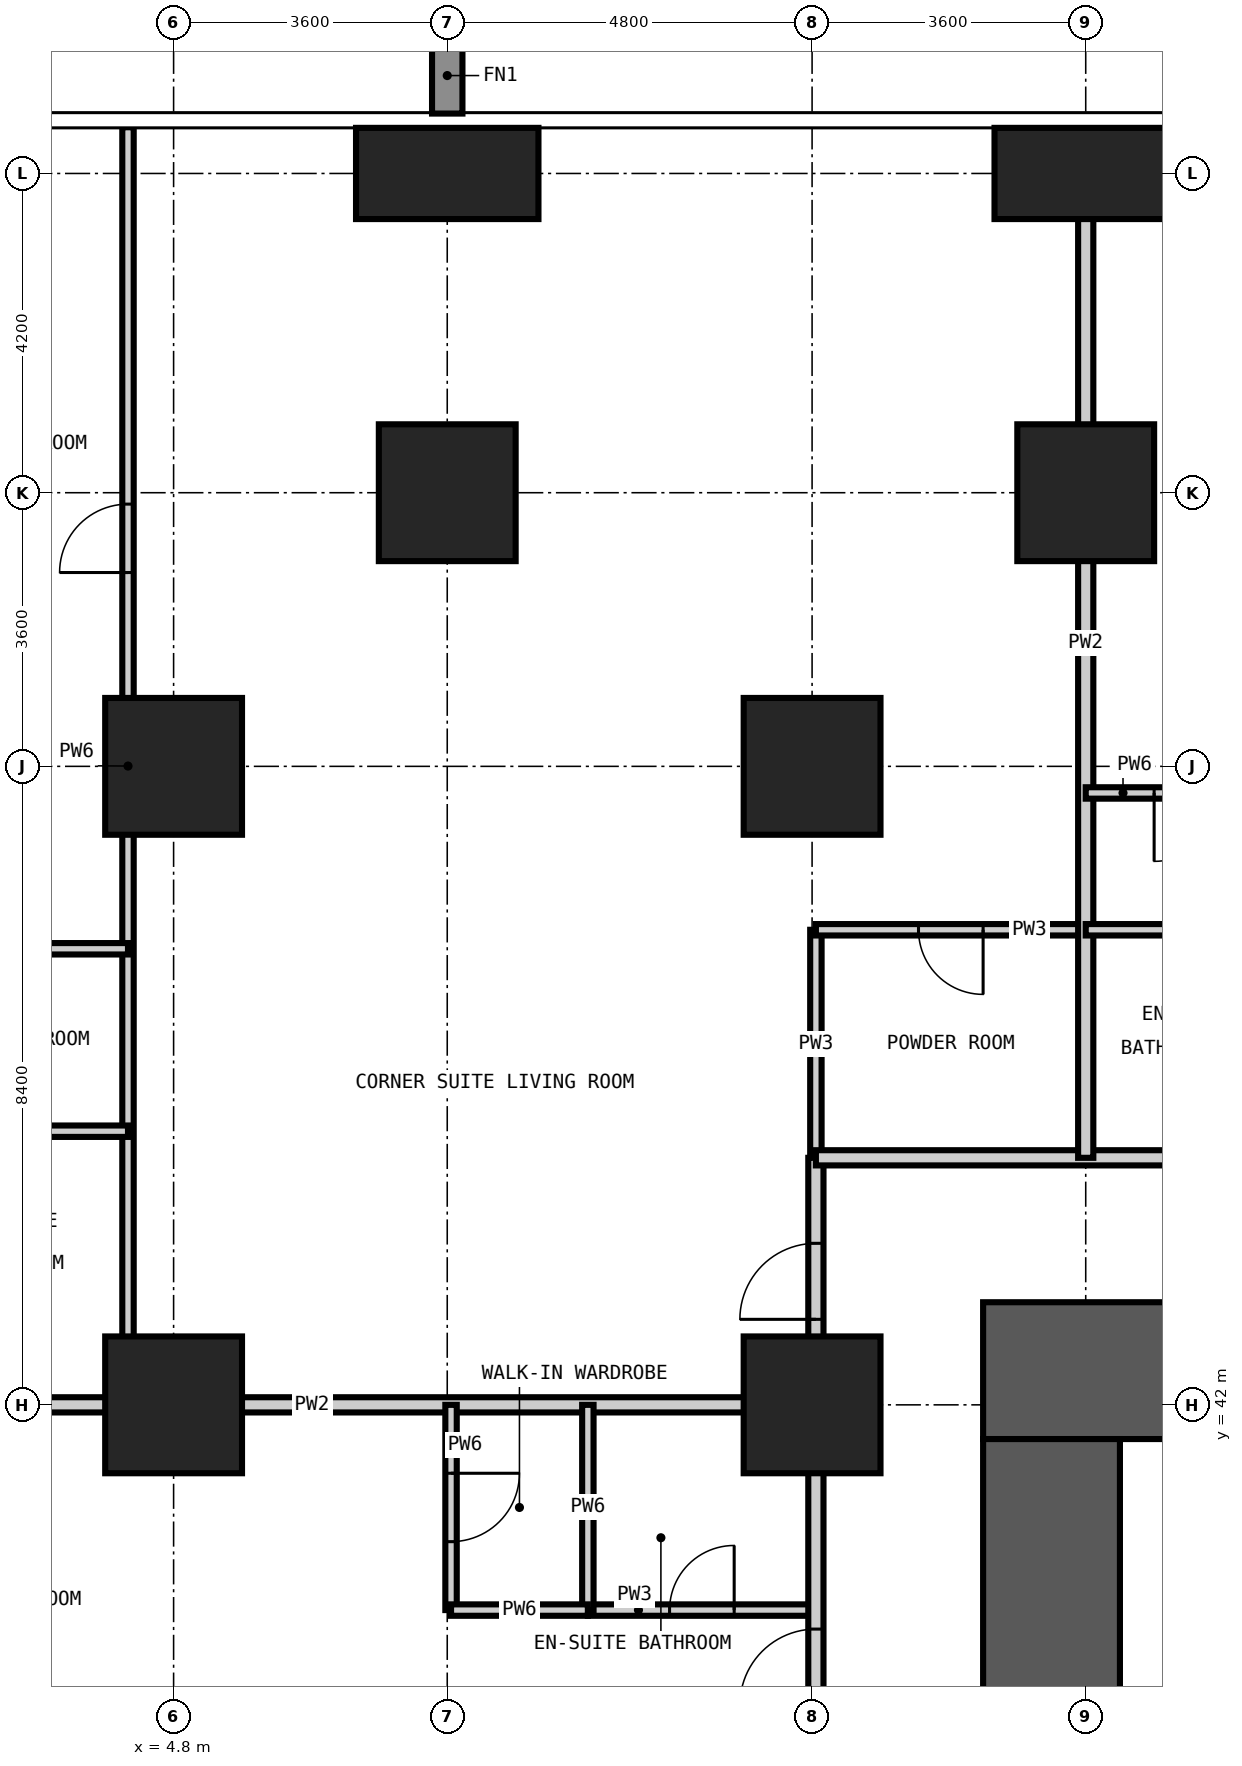
"""IFC4 building model, lengths in metres.
Left out: names, types, materials, properties, quantities, classifications, styles, units other than length and angle.
Written with IfcOpenShell. Run it as: python <this file> out.ifc"""

import sys

from ifc_helpers import new_model, si_unit, direction, frame, frame_2d, origin, origin_2d, place, context, subcontext, project, spatial, rectangle, extrude, element, fill, save


model = new_model("IFC4")
c1 = context("Model", 3, precision=1e-05, world=origin(), true_north=direction((0.0, 1.0)))
c2 = subcontext(c1, "Body", "Model", "MODEL_VIEW")
j1 = project(units=[si_unit("LENGTHUNIT", "METRE"), si_unit("PLANEANGLEUNIT", "RADIAN")], contexts=[c1])
p1 = place(None, origin())
s1 = spatial("IfcSite", under=j1, at=p1, CompositionType="ELEMENT")
p2 = place(p1, origin())
s2 = spatial("IfcBuilding", under=s1, at=p2, CompositionType="ELEMENT")
p3 = place(p2, frame((0.0, 0.0, 34.2)))
s3 = spatial("IfcBuildingStorey", under=s2, at=p3, CompositionType="ELEMENT", Elevation=34.2)
for number, where, z_axis, x_axis in (
    (1, (4.8, 42.0, -0.35), (0.0, 0.0, 1.0), (1.0, 0.0, 0.0)),
    (2, (4.8, 50.4, -0.35), (0.0, 0.0, 1.0), (1.0, 0.0, 0.0)),
    (3, (8.4, 54.0, -0.35), (0.0, 0.0, 1.0), (1.0, 0.0, 0.0)),
):
    element("IfcColumn", number, at=place(p3, frame(where, z_axis=z_axis, x_axis=x_axis)), inside=s3, PredefinedType="COLUMN", context=c2, shape_type="SweptSolid", body=[
        extrude(rectangle(XDim=1.8, YDim=1.8, at=origin_2d()), origin(), (0.0, 0.0, 1.0), 3.6),
    ])
p4 = place(p3, frame((8.4, 58.2, -0.35), z_axis=(0.0, 0.0, 1.0), x_axis=(1.0, 0.0, 0.0)))
e4 = element("IfcColumn", 4, at=p4, inside=s3, PredefinedType="COLUMN", context=c2, shape_type="SweptSolid", body=[
    extrude(rectangle(XDim=2.4, YDim=1.2, at=origin_2d()), origin(), (0.0, 0.0, 1.0), 3.6),
])
for number, where, z_axis, x_axis in (
    (5, (13.2, 42.0, -0.35), (0.0, 0.0, 1.0), (1.0, 0.0, 0.0)),
    (6, (13.2, 50.4, -0.35), (0.0, 0.0, 1.0), (1.0, 0.0, 0.0)),
    (7, (16.8, 54.0, -0.35), (0.0, 0.0, 1.0), (1.0, 0.0, 0.0)),
):
    element("IfcColumn", number, at=place(p3, frame(where, z_axis=z_axis, x_axis=x_axis)), inside=s3, PredefinedType="COLUMN", context=c2, shape_type="SweptSolid", body=[
        extrude(rectangle(XDim=1.8, YDim=1.8, at=origin_2d()), origin(), (0.0, 0.0, 1.0), 3.6),
    ])
p5 = place(p3, frame((16.8, 58.2, -0.35), z_axis=(0.0, 0.0, 1.0), x_axis=(1.0, 0.0, 0.0)))
e8 = element("IfcColumn", 8, at=p5, inside=s3, PredefinedType="COLUMN", context=c2, shape_type="SweptSolid", body=[
    extrude(rectangle(XDim=2.4, YDim=1.2, at=origin_2d()), origin(), (0.0, 0.0, 1.0), 3.6),
])
p6 = place(p3, frame((43.35, 42.45, -0.35), z_axis=(0.0, 0.0, 1.0), x_axis=(-1.0, 0.0, 0.0)))
e9 = element("IfcWall", 9, at=p6, inside=s3, PredefinedType="SHEAR", context=c2, shape_type="SweptSolid", body=[
    extrude(rectangle(XDim=27.9, YDim=1.8, at=frame_2d((13.95, 0.0))), origin(), (0.0, 0.0, 1.0), 3.6),
])
p7 = place(p6, frame((21.85, 0.0, 0.35)))
e10 = element("IfcOpeningElement", 10, at=p7, cuts=e9, PredefinedType="OPENING", context=c2, shape_type="SweptSolid", body=[
    extrude(rectangle(XDim=1.0, YDim=2.1, at=frame_2d((0.5, 1.05))), frame((0.0, 0.91, 0.0), z_axis=(0.0, -1.0, 0.0), x_axis=(1.0, 0.0, 0.0)), (0.0, 0.0, 1.0), 1.82),
])
p8 = place(p6, frame((11.25, 0.0, 0.35)))
e11 = element("IfcOpeningElement", 11, at=p8, cuts=e9, PredefinedType="OPENING", context=c2, shape_type="SweptSolid", body=[
    extrude(rectangle(XDim=1.2, YDim=2.2, at=frame_2d((0.6, 1.1))), frame((0.0, 0.91, 0.0), z_axis=(0.0, -1.0, 0.0), x_axis=(1.0, 0.0, 0.0)), (0.0, 0.0, 1.0), 1.82),
])
p9 = place(p3, frame((16.35, 41.55, -0.35), z_axis=(0.0, 0.0, 1.0), x_axis=(0.0, -1.0, 0.0)))
e12 = element("IfcWall", 12, at=p9, inside=s3, PredefinedType="SHEAR", context=c2, shape_type="SweptSolid", body=[
    extrude(rectangle(XDim=24.3, YDim=1.8, at=frame_2d((12.15, 0.0))), origin(), (0.0, 0.0, 1.0), 3.6),
])
p10 = place(p9, frame((11.25, 0.0, 0.35)))
e13 = element("IfcOpeningElement", 13, at=p10, cuts=e12, PredefinedType="OPENING", context=c2, shape_type="SweptSolid", body=[
    extrude(rectangle(XDim=1.8, YDim=2.2, at=frame_2d((0.9, 1.1))), frame((0.0, 0.91, 0.0), z_axis=(0.0, -1.0, 0.0), x_axis=(1.0, 0.0, 0.0)), (0.0, 0.0, 1.0), 1.82),
])
p11 = place(p9, frame((20.05, 0.0, 0.35)))
e14 = element("IfcOpeningElement", 14, at=p11, cuts=e12, PredefinedType="OPENING", context=c2, shape_type="SweptSolid", body=[
    extrude(rectangle(XDim=1.0, YDim=2.1, at=frame_2d((0.5, 1.05))), frame((0.0, 0.91, 0.0), z_axis=(0.0, -1.0, 0.0), x_axis=(1.0, 0.0, 0.0)), (0.0, 0.0, 1.0), 1.82),
])
p12 = place(p9, frame((5.35, 0.0, 0.35)))
e15 = element("IfcOpeningElement", 15, at=p12, cuts=e12, PredefinedType="OPENING", context=c2, shape_type="SweptSolid", body=[
    extrude(rectangle(XDim=1.0, YDim=2.1, at=frame_2d((0.5, 1.05))), frame((0.0, 0.91, 0.0), z_axis=(0.0, -1.0, 0.0), x_axis=(1.0, 0.0, 0.0)), (0.0, 0.0, 1.0), 1.82),
])
p13 = place(p3, frame((13.25, 45.25, 0.0), z_axis=(0.0, 0.0, 1.0), x_axis=(0.0, 1.0, 0.0)))
e16 = element("IfcWall", 16, at=p13, inside=s3, PredefinedType="PARTITIONING", context=c2, shape_type="SweptSolid", body=[
    extrude(rectangle(XDim=3.0, YDim=0.15, at=frame_2d((1.5, 0.0))), origin(), (0.0, 0.0, 1.0), 3.25),
])
p14 = place(p3, frame((10.25, 39.3, 0.0), z_axis=(0.0, 0.0, 1.0), x_axis=(1.0, 0.0, 0.0)))
e17 = element("IfcWall", 17, at=p14, inside=s3, PredefinedType="PARTITIONING", context=c2, shape_type="SweptSolid", body=[
    extrude(rectangle(XDim=3.0, YDim=0.15, at=frame_2d((1.5, 0.0))), origin(), (0.0, 0.0, 1.0), 3.25),
])
p15 = place(p14, frame((1.075, 0.0, 0.0)))
e18 = element("IfcOpeningElement", 18, at=p15, cuts=e17, PredefinedType="OPENING", context=c2, shape_type="SweptSolid", body=[
    extrude(rectangle(XDim=0.85, YDim=2.1, at=frame_2d((0.425, 1.05))), frame((0.0, 0.085, 0.0), z_axis=(0.0, -1.0, 0.0), x_axis=(1.0, 0.0, 0.0)), (0.0, 0.0, 1.0), 0.17),
])
p16 = place(p3, frame((13.25, 48.25, 0.0), z_axis=(0.0, 0.0, 1.0), x_axis=(1.0, 0.0, 0.0)))
e19 = element("IfcWall", 19, at=p16, inside=s3, PredefinedType="PARTITIONING", context=c2, shape_type="SweptSolid", body=[
    extrude(rectangle(XDim=3.55, YDim=0.15, at=frame_2d((1.775, 0.0))), origin(), (0.0, 0.0, 1.0), 3.25),
])
p17 = place(p16, frame((1.35, 0.0, 0.0)))
e20 = element("IfcOpeningElement", 20, at=p17, cuts=e19, PredefinedType="OPENING", context=c2, shape_type="SweptSolid", body=[
    extrude(rectangle(XDim=0.85, YDim=2.1, at=frame_2d((0.425, 1.05))), frame((0.0, 0.085, 0.0), z_axis=(0.0, -1.0, 0.0), x_axis=(1.0, 0.0, 0.0)), (0.0, 0.0, 1.0), 0.17),
])
p18 = place(p3, frame((13.25, 13.25, 0.0), z_axis=(0.0, 0.0, 1.0), x_axis=(0.0, 1.0, 0.0)))
e21 = element("IfcWall", 21, at=p18, inside=s3, PredefinedType="PARTITIONING", context=c2, shape_type="SweptSolid", body=[
    extrude(rectangle(XDim=32.0, YDim=0.2, at=frame_2d((16.0, 0.0))), origin(), (0.0, 0.0, 1.0), 3.25),
])
p19 = place(p18, frame((9.35, 0.0, 0.0)))
e22 = element("IfcOpeningElement", 22, at=p19, cuts=e21, PredefinedType="OPENING", context=c2, shape_type="SweptSolid", body=[
    extrude(rectangle(XDim=1.0, YDim=2.2, at=frame_2d((0.5, 1.1))), frame((0.0, 0.11, 0.0), z_axis=(0.0, -1.0, 0.0), x_axis=(1.0, 0.0, 0.0)), (0.0, 0.0, 1.0), 0.22),
])
p20 = place(p18, frame((16.4, 0.0, 0.0)))
e23 = element("IfcOpeningElement", 23, at=p20, cuts=e21, PredefinedType="OPENING", context=c2, shape_type="SweptSolid", body=[
    extrude(rectangle(XDim=1.0, YDim=2.2, at=frame_2d((0.5, 1.1))), frame((0.0, 0.11, 0.0), z_axis=(0.0, -1.0, 0.0), x_axis=(1.0, 0.0, 0.0)), (0.0, 0.0, 1.0), 0.22),
])
p21 = place(p18, frame((23.3, 0.0, 0.0)))
e24 = element("IfcOpeningElement", 24, at=p21, cuts=e21, PredefinedType="OPENING", context=c2, shape_type="SweptSolid", body=[
    extrude(rectangle(XDim=1.0, YDim=2.2, at=frame_2d((0.5, 1.1))), frame((0.0, 0.11, 0.0), z_axis=(0.0, -1.0, 0.0), x_axis=(1.0, 0.0, 0.0)), (0.0, 0.0, 1.0), 0.22),
])
p22 = place(p18, frame((24.8, 0.0, 0.0)))
e25 = element("IfcOpeningElement", 25, at=p22, cuts=e21, PredefinedType="OPENING", context=c2, shape_type="SweptSolid", body=[
    extrude(rectangle(XDim=1.0, YDim=2.2, at=frame_2d((0.5, 1.1))), frame((0.0, 0.11, 0.0), z_axis=(0.0, -1.0, 0.0), x_axis=(1.0, 0.0, 0.0)), (0.0, 0.0, 1.0), 0.22),
])
p23 = place(p18, frame((1.275, 0.0, 0.0)))
e26 = element("IfcOpeningElement", 26, at=p23, cuts=e21, PredefinedType="OPENING", context=c2, shape_type="SweptSolid", body=[
    extrude(rectangle(XDim=1.0, YDim=2.2, at=frame_2d((0.5, 1.1))), frame((0.0, 0.11, 0.0), z_axis=(0.0, -1.0, 0.0), x_axis=(1.0, 0.0, 0.0)), (0.0, 0.0, 1.0), 0.22),
])
p24 = place(p18, frame((29.875, 0.0, 0.0)))
e27 = element("IfcOpeningElement", 27, at=p24, cuts=e21, PredefinedType="OPENING", context=c2, shape_type="SweptSolid", body=[
    extrude(rectangle(XDim=1.0, YDim=2.2, at=frame_2d((0.5, 1.1))), frame((0.0, 0.11, 0.0), z_axis=(0.0, -1.0, 0.0), x_axis=(1.0, 0.0, 0.0)), (0.0, 0.0, 1.0), 0.22),
])
p25 = place(p3, frame((13.25, 45.25, 0.0), z_axis=(0.0, 0.0, 1.0), x_axis=(1.0, 0.0, 0.0)))
e28 = element("IfcWall", 28, at=p25, inside=s3, PredefinedType="PARTITIONING", context=c2, shape_type="SweptSolid", body=[
    extrude(rectangle(XDim=32.6, YDim=0.2, at=frame_2d((16.3, 0.0))), origin(), (0.0, 0.0, 1.0), 3.25),
])
p26 = place(p25, frame((6.5, 0.0, 0.0)))
e29 = element("IfcOpeningElement", 29, at=p26, cuts=e28, PredefinedType="OPENING", context=c2, shape_type="SweptSolid", body=[
    extrude(rectangle(XDim=1.0, YDim=2.2, at=frame_2d((0.5, 1.1))), frame((0.0, 0.11, 0.0), z_axis=(0.0, -1.0, 0.0), x_axis=(1.0, 0.0, 0.0)), (0.0, 0.0, 1.0), 0.22),
])
p27 = place(p25, frame((11.45, 0.0, 0.0)))
e30 = element("IfcOpeningElement", 30, at=p27, cuts=e28, PredefinedType="OPENING", context=c2, shape_type="SweptSolid", body=[
    extrude(rectangle(XDim=1.0, YDim=2.2, at=frame_2d((0.5, 1.1))), frame((0.0, 0.11, 0.0), z_axis=(0.0, -1.0, 0.0), x_axis=(1.0, 0.0, 0.0)), (0.0, 0.0, 1.0), 0.22),
])
p28 = place(p25, frame((19.85, 0.0, 0.0)))
e31 = element("IfcOpeningElement", 31, at=p28, cuts=e28, PredefinedType="OPENING", context=c2, shape_type="SweptSolid", body=[
    extrude(rectangle(XDim=1.0, YDim=2.2, at=frame_2d((0.5, 1.1))), frame((0.0, 0.11, 0.0), z_axis=(0.0, -1.0, 0.0), x_axis=(1.0, 0.0, 0.0)), (0.0, 0.0, 1.0), 0.22),
])
p29 = place(p25, frame((24.8, 0.0, 0.0)))
e32 = element("IfcOpeningElement", 32, at=p29, cuts=e28, PredefinedType="OPENING", context=c2, shape_type="SweptSolid", body=[
    extrude(rectangle(XDim=1.0, YDim=2.2, at=frame_2d((0.5, 1.1))), frame((0.0, 0.11, 0.0), z_axis=(0.0, -1.0, 0.0), x_axis=(1.0, 0.0, 0.0)), (0.0, 0.0, 1.0), 0.22),
])
p30 = place(p3, frame((16.8, 45.25, 0.0), z_axis=(0.0, 0.0, 1.0), x_axis=(0.0, 1.0, 0.0)))
e33 = element("IfcWall", 33, at=p30, inside=s3, PredefinedType="PARTITIONING", context=c2, shape_type="SweptSolid", body=[
    extrude(rectangle(XDim=13.558, YDim=0.2, at=frame_2d((6.779, 0.0))), origin(), (0.0, 0.0, 1.0), 3.25),
])
p31 = place(p3, frame((-0.008, 42.0, 0.0), z_axis=(0.0, 0.0, 1.0), x_axis=(1.0, 0.0, 0.0)))
e34 = element("IfcWall", 34, at=p31, inside=s3, PredefinedType="PARTITIONING", context=c2, shape_type="SweptSolid", body=[
    extrude(rectangle(XDim=13.258, YDim=0.2, at=frame_2d((6.629, 0.0))), origin(), (0.0, 0.0, 1.0), 3.25),
])
p32 = place(p3, frame((4.2, 42.0, 0.0), z_axis=(0.0, 0.0, 1.0), x_axis=(0.0, 1.0, 0.0)))
e35 = element("IfcWall", 35, at=p32, inside=s3, PredefinedType="PARTITIONING", context=c2, shape_type="SweptSolid", body=[
    extrude(rectangle(XDim=16.808, YDim=0.15, at=frame_2d((8.404, 0.0))), origin(), (0.0, 0.0, 1.0), 3.25),
])
p33 = place(p32, frame((10.95, 0.0, 0.0)))
e36 = element("IfcOpeningElement", 36, at=p33, cuts=e35, PredefinedType="OPENING", context=c2, shape_type="SweptSolid", body=[
    extrude(rectangle(XDim=0.9, YDim=2.1, at=frame_2d((0.45, 1.05))), frame((0.0, 0.085, 0.0), z_axis=(0.0, -1.0, 0.0), x_axis=(1.0, 0.0, 0.0)), (0.0, 0.0, 1.0), 0.17),
])
p34 = place(p3, frame((8.45, 39.3, 0.0), z_axis=(0.0, 0.0, 1.0), x_axis=(0.0, 1.0, 0.0)))
e37 = element("IfcWall", 37, at=p34, inside=s3, PredefinedType="PARTITIONING", context=c2, shape_type="SweptSolid", body=[
    extrude(rectangle(XDim=2.7, YDim=0.15, at=frame_2d((1.35, 0.0))), origin(), (0.0, 0.0, 1.0), 3.25),
])
p35 = place(p34, frame((0.9, 0.0, 0.0)))
e38 = element("IfcOpeningElement", 38, at=p35, cuts=e37, PredefinedType="OPENING", context=c2, shape_type="SweptSolid", body=[
    extrude(rectangle(XDim=0.9, YDim=2.1, at=frame_2d((0.45, 1.05))), frame((0.0, 0.085, 0.0), z_axis=(0.0, -1.0, 0.0), x_axis=(1.0, 0.0, 0.0)), (0.0, 0.0, 1.0), 0.17),
])
p36 = place(p3, frame((10.25, 39.3, 0.0), z_axis=(0.0, 0.0, 1.0), x_axis=(0.0, 1.0, 0.0)))
e39 = element("IfcWall", 39, at=p36, inside=s3, PredefinedType="PARTITIONING", context=c2, shape_type="SweptSolid", body=[
    extrude(rectangle(XDim=2.7, YDim=0.15, at=frame_2d((1.35, 0.0))), origin(), (0.0, 0.0, 1.0), 3.25),
])
p37 = place(p3, frame((8.45, 39.3, 0.0), z_axis=(0.0, 0.0, 1.0), x_axis=(1.0, 0.0, 0.0)))
e40 = element("IfcWall", 40, at=p37, inside=s3, PredefinedType="PARTITIONING", context=c2, shape_type="SweptSolid", body=[
    extrude(rectangle(XDim=1.8, YDim=0.15, at=frame_2d((0.9, 0.0))), origin(), (0.0, 0.0, 1.0), 3.25),
])
p38 = place(p3, frame((1.2, 45.6, 0.0), z_axis=(0.0, 0.0, 1.0), x_axis=(1.0, 0.0, 0.0)))
e41 = element("IfcWall", 41, at=p38, inside=s3, PredefinedType="PARTITIONING", context=c2, shape_type="SweptSolid", body=[
    extrude(rectangle(XDim=3.0, YDim=0.15, at=frame_2d((1.5, 0.0))), origin(), (0.0, 0.0, 1.0), 3.25),
])
p39 = place(p3, frame((1.2, 48.0, 0.0), z_axis=(0.0, 0.0, 1.0), x_axis=(1.0, 0.0, 0.0)))
e42 = element("IfcWall", 42, at=p39, inside=s3, PredefinedType="PARTITIONING", context=c2, shape_type="SweptSolid", body=[
    extrude(rectangle(XDim=3.0, YDim=0.15, at=frame_2d((1.5, 0.0))), origin(), (0.0, 0.0, 1.0), 3.25),
])
p40 = place(p39, frame((1.05, 0.0, 0.0)))
e43 = element("IfcOpeningElement", 43, at=p40, cuts=e42, PredefinedType="OPENING", context=c2, shape_type="SweptSolid", body=[
    extrude(rectangle(XDim=0.9, YDim=2.1, at=frame_2d((0.45, 1.05))), frame((0.0, 0.085, 0.0), z_axis=(0.0, -1.0, 0.0), x_axis=(1.0, 0.0, 0.0)), (0.0, 0.0, 1.0), 0.17),
])
p41 = place(p3, frame((16.8, 48.25, 0.0), z_axis=(0.0, 0.0, 1.0), x_axis=(1.0, 0.0, 0.0)))
e44 = element("IfcWall", 44, at=p41, inside=s3, PredefinedType="PARTITIONING", context=c2, shape_type="SweptSolid", body=[
    extrude(rectangle(XDim=2.7, YDim=0.15, at=frame_2d((1.35, 0.0))), origin(), (0.0, 0.0, 1.0), 3.25),
])
p42 = place(p3, frame((16.8, 50.05, 0.0), z_axis=(0.0, 0.0, 1.0), x_axis=(1.0, 0.0, 0.0)))
e45 = element("IfcWall", 45, at=p42, inside=s3, PredefinedType="PARTITIONING", context=c2, shape_type="SweptSolid", body=[
    extrude(rectangle(XDim=2.7, YDim=0.15, at=frame_2d((1.35, 0.0))), origin(), (0.0, 0.0, 1.0), 3.25),
])
p43 = place(p42, frame((0.9, 0.0, 0.0)))
e46 = element("IfcOpeningElement", 46, at=p43, cuts=e45, PredefinedType="OPENING", context=c2, shape_type="SweptSolid", body=[
    extrude(rectangle(XDim=0.9, YDim=2.1, at=frame_2d((0.45, 1.05))), frame((0.0, 0.085, 0.0), z_axis=(0.0, -1.0, 0.0), x_axis=(1.0, 0.0, 0.0)), (0.0, 0.0, 1.0), 0.17),
])
p44 = place(p43, frame((0.9, 0.0, 0.0), z_axis=(0.0, 0.0, 1.0), x_axis=(-1.0, 0.0, 0.0)))
e47 = element("IfcDoor", 47, at=p44, inside=s3, OperationType="SINGLE_SWING_RIGHT", PredefinedType="DOOR", context=c2, shape_type="SweptSolid", body=[
    extrude(rectangle(XDim=0.9, YDim=2.1, at=frame_2d((0.45, 1.05))), frame((0.0, 0.025, 0.0), z_axis=(0.0, -1.0, 0.0), x_axis=(1.0, 0.0, 0.0)), (0.0, 0.0, 1.0), 0.05),
])
fill(e46, e47)
p45 = place(p22, origin())
e48 = element("IfcDoor", 48, at=p45, inside=s3, OperationType="SINGLE_SWING_LEFT", PredefinedType="DOOR", context=c2, shape_type="SweptSolid", body=[
    extrude(rectangle(XDim=1.0, YDim=2.2, at=frame_2d((0.5, 1.1))), frame((0.0, 0.025, 0.0), z_axis=(0.0, -1.0, 0.0), x_axis=(1.0, 0.0, 0.0)), (0.0, 0.0, 1.0), 0.05),
])
fill(e25, e48)
p46 = place(p15, origin())
e49 = element("IfcDoor", 49, at=p46, inside=s3, OperationType="SINGLE_SWING_RIGHT", PredefinedType="DOOR", context=c2, shape_type="SweptSolid", body=[
    extrude(rectangle(XDim=0.85, YDim=2.1, at=frame_2d((0.425, 1.05))), frame((0.0, 0.025, 0.0), z_axis=(0.0, -1.0, 0.0), x_axis=(1.0, 0.0, 0.0)), (0.0, 0.0, 1.0), 0.05),
])
fill(e18, e49)
p47 = place(p35, frame((0.9, 0.0, 0.0), z_axis=(0.0, 0.0, 1.0), x_axis=(-1.0, 0.0, 0.0)))
e50 = element("IfcDoor", 50, at=p47, inside=s3, OperationType="SINGLE_SWING_LEFT", PredefinedType="DOOR", context=c2, shape_type="SweptSolid", body=[
    extrude(rectangle(XDim=0.9, YDim=2.1, at=frame_2d((0.45, 1.05))), frame((0.0, 0.025, 0.0), z_axis=(0.0, -1.0, 0.0), x_axis=(1.0, 0.0, 0.0)), (0.0, 0.0, 1.0), 0.05),
])
fill(e38, e50)
p48 = place(p24, origin())
e51 = element("IfcDoor", 51, at=p48, inside=s3, OperationType="SINGLE_SWING_LEFT", PredefinedType="DOOR", context=c2, shape_type="SweptSolid", body=[
    extrude(rectangle(XDim=1.0, YDim=2.2, at=frame_2d((0.5, 1.1))), frame((0.0, 0.025, 0.0), z_axis=(0.0, -1.0, 0.0), x_axis=(1.0, 0.0, 0.0)), (0.0, 0.0, 1.0), 0.05),
])
fill(e27, e51)
p49 = place(p17, frame((0.85, 0.0, 0.0), z_axis=(0.0, 0.0, 1.0), x_axis=(-1.0, 0.0, 0.0)))
e52 = element("IfcDoor", 52, at=p49, inside=s3, OperationType="SINGLE_SWING_LEFT", PredefinedType="DOOR", context=c2, shape_type="SweptSolid", body=[
    extrude(rectangle(XDim=0.85, YDim=2.1, at=frame_2d((0.425, 1.05))), frame((0.0, 0.025, 0.0), z_axis=(0.0, -1.0, 0.0), x_axis=(1.0, 0.0, 0.0)), (0.0, 0.0, 1.0), 0.05),
])
fill(e20, e52)
p50 = place(p33, origin())
e53 = element("IfcDoor", 53, at=p50, inside=s3, OperationType="SINGLE_SWING_LEFT", PredefinedType="DOOR", context=c2, shape_type="SweptSolid", body=[
    extrude(rectangle(XDim=0.9, YDim=2.1, at=frame_2d((0.45, 1.05))), frame((0.0, 0.025, 0.0), z_axis=(0.0, -1.0, 0.0), x_axis=(1.0, 0.0, 0.0)), (0.0, 0.0, 1.0), 0.05),
])
fill(e36, e53)
save(model, sys.argv[1])
